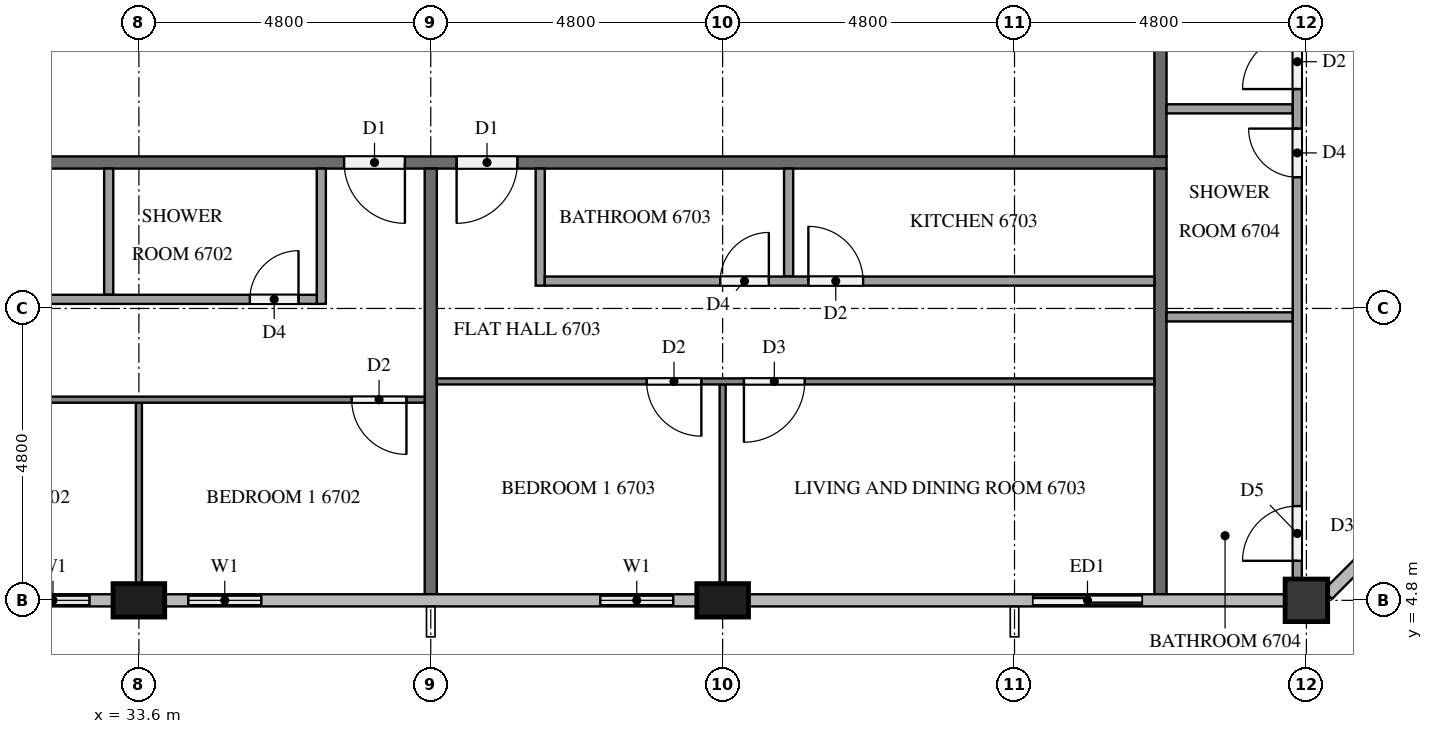
"""IFC4 building model, lengths in metres.
Left out: names, types, materials, properties, quantities, classifications, styles, units other than length and angle.
Written with IfcOpenShell. Run it as: python <this file> out.ifc"""

import sys

from ifc_helpers import new_model, si_unit, direction, frame, frame_2d, origin, origin_2d, place, context, subcontext, project, spatial, rectangle, extrude, element, fill, save


model = new_model("IFC4")
c1 = context("Model", 3, precision=1e-05, world=origin(), true_north=direction((0.0, 1.0)))
c2 = subcontext(c1, "Body", "Model", "MODEL_VIEW")
j1 = project(units=[si_unit("LENGTHUNIT", "METRE"), si_unit("PLANEANGLEUNIT", "RADIAN")], contexts=[c1])
p1 = place(None, origin())
s1 = spatial("IfcSite", under=j1, at=p1, CompositionType="ELEMENT")
p2 = place(p1, origin())
s2 = spatial("IfcBuilding", under=s1, at=p2, CompositionType="ELEMENT")
p3 = place(p2, frame((0.0, 0.0, 256.2)))
s3 = spatial("IfcBuildingStorey", under=s2, at=p3, CompositionType="ELEMENT", Elevation=256.2)
for number, where, z_axis, x_axis in (
    (1, (33.6, 4.8, 0.0), (0.0, 0.0, 1.0), (1.0, 0.0, 0.0)),
    (2, (43.2, 4.8, 0.0), (0.0, 0.0, 1.0), (1.0, 0.0, 0.0)),
):
    element("IfcColumn", number, at=place(p3, frame(where, z_axis=z_axis, x_axis=x_axis)), inside=s3, PredefinedType="COLUMN", context=c2, shape_type="SweptSolid", body=[
        extrude(rectangle(XDim=0.85, YDim=0.55, at=origin_2d()), origin(), (0.0, 0.0, 1.0), 3.2),
    ])
p4 = place(p3, frame((52.8, 4.8, 0.0), z_axis=(0.0, 0.0, 1.0), x_axis=(1.0, 0.0, 0.0)))
e3 = element("IfcColumn", 3, at=p4, inside=s3, PredefinedType="COLUMN", context=c2, shape_type="SweptSolid", body=[
    extrude(rectangle(XDim=0.7, YDim=0.7, at=origin_2d()), origin(), (0.0, 0.0, 1.0), 3.2),
])
p5 = place(p3, frame((31.2, 4.8, 0.0), z_axis=(0.0, 0.0, 1.0), x_axis=(1.0, 0.0, 0.0)))
e4 = element("IfcWall", 4, at=p5, inside=s3, PredefinedType="SOLIDWALL", context=c2, shape_type="SweptSolid", body=[
    extrude(rectangle(XDim=1.975, YDim=0.15, at=frame_2d((0.988, 0.0))), origin(), (0.0, 0.0, 1.0), 3.2),
])
p6 = place(p5, frame((0.387, 0.0, 0.9)))
e5 = element("IfcOpeningElement", 5, at=p6, cuts=e4, PredefinedType="OPENING", context=c2, shape_type="SweptSolid", body=[
    extrude(rectangle(XDim=1.2, YDim=1.4, at=frame_2d((0.6, 0.7))), frame((0.0, 0.085, 0.0), z_axis=(0.0, -1.0, 0.0), x_axis=(1.0, 0.0, 0.0)), (0.0, 0.0, 1.0), 0.17),
])
p7 = place(p3, frame((34.025, 4.8, 0.0), z_axis=(0.0, 0.0, 1.0), x_axis=(1.0, 0.0, 0.0)))
e6 = element("IfcWall", 6, at=p7, inside=s3, PredefinedType="SOLIDWALL", context=c2, shape_type="SweptSolid", body=[
    extrude(rectangle(XDim=1.975, YDim=0.15, at=frame_2d((0.988, 0.0))), origin(), (0.0, 0.0, 1.0), 3.2),
])
p8 = place(p7, frame((0.387, 0.0, 0.9)))
e7 = element("IfcOpeningElement", 7, at=p8, cuts=e6, PredefinedType="OPENING", context=c2, shape_type="SweptSolid", body=[
    extrude(rectangle(XDim=1.2, YDim=1.4, at=frame_2d((0.6, 0.7))), frame((0.0, 0.085, 0.0), z_axis=(0.0, -1.0, 0.0), x_axis=(1.0, 0.0, 0.0)), (0.0, 0.0, 1.0), 0.17),
])
p9 = place(p3, frame((40.8, 4.8, 0.0), z_axis=(0.0, 0.0, 1.0), x_axis=(1.0, 0.0, 0.0)))
e8 = element("IfcWall", 8, at=p9, inside=s3, PredefinedType="SOLIDWALL", context=c2, shape_type="SweptSolid", body=[
    extrude(rectangle(XDim=1.975, YDim=0.15, at=frame_2d((0.987, 0.0))), origin(), (0.0, 0.0, 1.0), 3.2),
])
p10 = place(p9, frame((0.387, 0.0, 0.9)))
e9 = element("IfcOpeningElement", 9, at=p10, cuts=e8, PredefinedType="OPENING", context=c2, shape_type="SweptSolid", body=[
    extrude(rectangle(XDim=1.2, YDim=1.4, at=frame_2d((0.6, 0.7))), frame((0.0, 0.085, 0.0), z_axis=(0.0, -1.0, 0.0), x_axis=(1.0, 0.0, 0.0)), (0.0, 0.0, 1.0), 0.17),
])
p11 = place(p3, frame((48.0, 4.8, 0.0), z_axis=(0.0, 0.0, 1.0), x_axis=(1.0, 0.0, 0.0)))
e10 = element("IfcWall", 10, at=p11, inside=s3, PredefinedType="SOLIDWALL", context=c2, shape_type="SweptSolid", body=[
    extrude(rectangle(XDim=2.4, YDim=0.15, at=frame_2d((1.2, 0.0))), origin(), (0.0, 0.0, 1.0), 3.2),
])
p12 = place(p11, frame((0.3, 0.0, 0.0)))
e11 = element("IfcOpeningElement", 11, at=p12, cuts=e10, PredefinedType="OPENING", context=c2, shape_type="SweptSolid", body=[
    extrude(rectangle(XDim=1.8, YDim=2.4, at=frame_2d((0.9, 1.2))), frame((0.0, 0.085, 0.0), z_axis=(0.0, -1.0, 0.0), x_axis=(1.0, 0.0, 0.0)), (0.0, 0.0, 1.0), 0.17),
])
p13 = place(p3, frame((50.5, 12.0, 0.0), z_axis=(0.0, 0.0, 1.0), x_axis=(-1.0, 0.0, 0.0)))
e12 = element("IfcWall", 12, at=p13, inside=s3, PredefinedType="PARTITIONING", context=c2, shape_type="SweptSolid", body=[
    extrude(rectangle(XDim=38.6, YDim=0.2, at=frame_2d((19.3, 0.0))), origin(), (0.0, 0.0, 1.0), 3.2),
])
p14 = place(p13, frame((37.075, 0.0, 0.0)))
e13 = element("IfcOpeningElement", 13, at=p14, cuts=e12, PredefinedType="OPENING", context=c2, shape_type="SweptSolid", body=[
    extrude(rectangle(XDim=1.0, YDim=2.1, at=frame_2d((0.5, 1.05))), frame((0.0, 0.11, 0.0), z_axis=(0.0, -1.0, 0.0), x_axis=(1.0, 0.0, 0.0)), (0.0, 0.0, 1.0), 0.22),
])
p15 = place(p13, frame((12.525, 0.0, 0.0)))
e14 = element("IfcOpeningElement", 14, at=p15, cuts=e12, PredefinedType="OPENING", context=c2, shape_type="SweptSolid", body=[
    extrude(rectangle(XDim=1.0, YDim=2.1, at=frame_2d((0.5, 1.05))), frame((0.0, 0.11, 0.0), z_axis=(0.0, -1.0, 0.0), x_axis=(1.0, 0.0, 0.0)), (0.0, 0.0, 1.0), 0.22),
])
p16 = place(p13, frame((10.675, 0.0, 0.0)))
e15 = element("IfcOpeningElement", 15, at=p16, cuts=e12, PredefinedType="OPENING", context=c2, shape_type="SweptSolid", body=[
    extrude(rectangle(XDim=1.0, YDim=2.1, at=frame_2d((0.5, 1.05))), frame((0.0, 0.11, 0.0), z_axis=(0.0, -1.0, 0.0), x_axis=(1.0, 0.0, 0.0)), (0.0, 0.0, 1.0), 0.22),
])
p17 = place(p3, frame((50.4, 40.7, 0.0), z_axis=(0.0, 0.0, 1.0), x_axis=(0.0, -1.0, 0.0)))
e16 = element("IfcWall", 16, at=p17, inside=s3, PredefinedType="PARTITIONING", context=c2, shape_type="SweptSolid", body=[
    extrude(rectangle(XDim=28.6, YDim=0.2, at=frame_2d((14.3, 0.0))), origin(), (0.0, 0.0, 1.0), 3.2),
])
p18 = place(p17, frame((19.525, 0.0, 0.0)))
e17 = element("IfcOpeningElement", 17, at=p18, cuts=e16, PredefinedType="OPENING", context=c2, shape_type="SweptSolid", body=[
    extrude(rectangle(XDim=1.0, YDim=2.1, at=frame_2d((0.5, 1.05))), frame((0.0, 0.11, 0.0), z_axis=(0.0, -1.0, 0.0), x_axis=(1.0, 0.0, 0.0)), (0.0, 0.0, 1.0), 0.22),
])
p19 = place(p17, frame((17.675, 0.0, 0.0)))
e18 = element("IfcOpeningElement", 18, at=p19, cuts=e16, PredefinedType="OPENING", context=c2, shape_type="SweptSolid", body=[
    extrude(rectangle(XDim=1.0, YDim=2.1, at=frame_2d((0.5, 1.05))), frame((0.0, 0.11, 0.0), z_axis=(0.0, -1.0, 0.0), x_axis=(1.0, 0.0, 0.0)), (0.0, 0.0, 1.0), 0.22),
])
p20 = place(p17, frame((0.325, 0.0, 0.0)))
e19 = element("IfcOpeningElement", 19, at=p20, cuts=e16, PredefinedType="OPENING", context=c2, shape_type="SweptSolid", body=[
    extrude(rectangle(XDim=1.0, YDim=2.1, at=frame_2d((0.5, 1.05))), frame((0.0, 0.11, 0.0), z_axis=(0.0, -1.0, 0.0), x_axis=(1.0, 0.0, 0.0)), (0.0, 0.0, 1.0), 0.22),
])
for number, where, z_axis, x_axis in (
    (20, (38.4, 11.9, 0.0), (0.0, 0.0, 1.0), (0.0, -1.0, 0.0)),
    (21, (50.4, 11.9, 0.0), (0.0, 0.0, 1.0), (0.0, -1.0, 0.0)),
):
    element("IfcWall", number, at=place(p3, frame(where, z_axis=z_axis, x_axis=x_axis)), inside=s3, PredefinedType="PARTITIONING", context=c2, shape_type="SweptSolid", body=[
        extrude(rectangle(XDim=7.0, YDim=0.2, at=frame_2d((3.5, 0.0))), origin(), (0.0, 0.0, 1.0), 3.2),
    ])
p21 = place(p3, frame((33.6, 8.05, 0.0), z_axis=(0.0, 0.0, 1.0), x_axis=(0.0, -1.0, 0.0)))
e22 = element("IfcWall", 22, at=p21, inside=s3, PredefinedType="PARTITIONING", context=c2, shape_type="SweptSolid", body=[
    extrude(rectangle(XDim=2.975, YDim=0.1, at=frame_2d((1.488, 0.0))), origin(), (0.0, 0.0, 1.0), 3.2),
])
p22 = place(p3, frame((38.3, 8.1, 0.0), z_axis=(0.0, 0.0, 1.0), x_axis=(-1.0, 0.0, 0.0)))
e23 = element("IfcWall", 23, at=p22, inside=s3, PredefinedType="PARTITIONING", context=c2, shape_type="SweptSolid", body=[
    extrude(rectangle(XDim=16.6, YDim=0.1, at=frame_2d((8.3, 0.0))), origin(), (0.0, 0.0, 1.0), 3.2),
])
p23 = place(p22, frame((0.3, 0.0, 0.0)))
e24 = element("IfcOpeningElement", 24, at=p23, cuts=e23, PredefinedType="OPENING", context=c2, shape_type="SweptSolid", body=[
    extrude(rectangle(XDim=0.9, YDim=2.1, at=frame_2d((0.45, 1.05))), frame((0.0, 0.06, 0.0), z_axis=(0.0, -1.0, 0.0), x_axis=(1.0, 0.0, 0.0)), (0.0, 0.0, 1.0), 0.12),
])
p24 = place(p22, frame((8.25, 0.0, 0.0)))
e25 = element("IfcOpeningElement", 25, at=p24, cuts=e23, PredefinedType="OPENING", context=c2, shape_type="SweptSolid", body=[
    extrude(rectangle(XDim=0.9, YDim=2.1, at=frame_2d((0.45, 1.05))), frame((0.0, 0.06, 0.0), z_axis=(0.0, -1.0, 0.0), x_axis=(1.0, 0.0, 0.0)), (0.0, 0.0, 1.0), 0.12),
])
p25 = place(p22, frame((9.85, 0.0, 0.0)))
e26 = element("IfcOpeningElement", 26, at=p25, cuts=e23, PredefinedType="OPENING", context=c2, shape_type="SweptSolid", body=[
    extrude(rectangle(XDim=1.0, YDim=2.1, at=frame_2d((0.5, 1.05))), frame((0.0, 0.06, 0.0), z_axis=(0.0, -1.0, 0.0), x_axis=(1.0, 0.0, 0.0)), (0.0, 0.0, 1.0), 0.12),
])
p26 = place(p3, frame((33.104, 11.9, 0.0), z_axis=(0.0, 0.0, 1.0), x_axis=(0.0, -1.0, 0.0)))
e27 = element("IfcWall", 27, at=p26, inside=s3, PredefinedType="PARTITIONING", context=c2, shape_type="SweptSolid", body=[
    extrude(rectangle(XDim=2.075, YDim=0.15, at=frame_2d((1.038, 0.0))), origin(), (0.0, 0.0, 1.0), 3.2),
])
p27 = place(p3, frame((36.6, 11.9, 0.0), z_axis=(0.0, 0.0, 1.0), x_axis=(0.0, -1.0, 0.0)))
e28 = element("IfcWall", 28, at=p27, inside=s3, PredefinedType="PARTITIONING", context=c2, shape_type="SweptSolid", body=[
    extrude(rectangle(XDim=2.225, YDim=0.15, at=frame_2d((1.112, 0.0))), origin(), (0.0, 0.0, 1.0), 3.2),
])
p28 = place(p3, frame((21.7, 9.75, 0.0), z_axis=(0.0, 0.0, 1.0), x_axis=(1.0, 0.0, 0.0)))
e29 = element("IfcWall", 29, at=p28, inside=s3, PredefinedType="PARTITIONING", context=c2, shape_type="SweptSolid", body=[
    extrude(rectangle(XDim=14.825, YDim=0.15, at=frame_2d((7.413, 0.0))), origin(), (0.0, 0.0, 1.0), 3.2),
])
p29 = place(p28, frame((13.725, 0.0, 0.0)))
e30 = element("IfcOpeningElement", 30, at=p29, cuts=e29, PredefinedType="OPENING", context=c2, shape_type="SweptSolid", body=[
    extrude(rectangle(XDim=0.8, YDim=2.1, at=frame_2d((0.4, 1.05))), frame((0.0, 0.085, 0.0), z_axis=(0.0, -1.0, 0.0), x_axis=(1.0, 0.0, 0.0)), (0.0, 0.0, 1.0), 0.17),
])
p30 = place(p28, frame((7.167, 0.0, 0.0)))
e31 = element("IfcOpeningElement", 31, at=p30, cuts=e29, PredefinedType="OPENING", context=c2, shape_type="SweptSolid", body=[
    extrude(rectangle(XDim=0.9, YDim=2.1, at=frame_2d((0.45, 1.05))), frame((0.0, 0.085, 0.0), z_axis=(0.0, -1.0, 0.0), x_axis=(1.0, 0.0, 0.0)), (0.0, 0.0, 1.0), 0.17),
])
p31 = place(p28, frame((5.617, 0.0, 0.0)))
e32 = element("IfcOpeningElement", 32, at=p31, cuts=e29, PredefinedType="OPENING", context=c2, shape_type="SweptSolid", body=[
    extrude(rectangle(XDim=0.9, YDim=2.1, at=frame_2d((0.45, 1.05))), frame((0.0, 0.085, 0.0), z_axis=(0.0, -1.0, 0.0), x_axis=(1.0, 0.0, 0.0)), (0.0, 0.0, 1.0), 0.17),
])
p32 = place(p3, frame((43.2, 8.35, 0.0), z_axis=(0.0, 0.0, 1.0), x_axis=(0.0, -1.0, 0.0)))
e33 = element("IfcWall", 33, at=p32, inside=s3, PredefinedType="PARTITIONING", context=c2, shape_type="SweptSolid", body=[
    extrude(rectangle(XDim=3.275, YDim=0.1, at=frame_2d((1.638, 0.0))), origin(), (0.0, 0.0, 1.0), 3.2),
])
p33 = place(p3, frame((50.3, 8.4, 0.0), z_axis=(0.0, 0.0, 1.0), x_axis=(-1.0, 0.0, 0.0)))
e34 = element("IfcWall", 34, at=p33, inside=s3, PredefinedType="PARTITIONING", context=c2, shape_type="SweptSolid", body=[
    extrude(rectangle(XDim=11.8, YDim=0.1, at=frame_2d((5.9, 0.0))), origin(), (0.0, 0.0, 1.0), 3.2),
])
p34 = place(p33, frame((7.45, 0.0, 0.0)))
e35 = element("IfcOpeningElement", 35, at=p34, cuts=e34, PredefinedType="OPENING", context=c2, shape_type="SweptSolid", body=[
    extrude(rectangle(XDim=0.9, YDim=2.1, at=frame_2d((0.45, 1.05))), frame((0.0, 0.06, 0.0), z_axis=(0.0, -1.0, 0.0), x_axis=(1.0, 0.0, 0.0)), (0.0, 0.0, 1.0), 0.12),
])
p35 = place(p33, frame((5.75, 0.0, 0.0)))
e36 = element("IfcOpeningElement", 36, at=p35, cuts=e34, PredefinedType="OPENING", context=c2, shape_type="SweptSolid", body=[
    extrude(rectangle(XDim=1.0, YDim=2.1, at=frame_2d((0.5, 1.05))), frame((0.0, 0.06, 0.0), z_axis=(0.0, -1.0, 0.0), x_axis=(1.0, 0.0, 0.0)), (0.0, 0.0, 1.0), 0.12),
])
p36 = place(p3, frame((44.285, 11.9, 0.0), z_axis=(0.0, 0.0, 1.0), x_axis=(0.0, -1.0, 0.0)))
e37 = element("IfcWall", 37, at=p36, inside=s3, PredefinedType="PARTITIONING", context=c2, shape_type="SweptSolid", body=[
    extrude(rectangle(XDim=1.775, YDim=0.15, at=frame_2d((0.887, 0.0))), origin(), (0.0, 0.0, 1.0), 3.2),
])
p37 = place(p3, frame((40.2, 11.9, 0.0), z_axis=(0.0, 0.0, 1.0), x_axis=(0.0, -1.0, 0.0)))
e38 = element("IfcWall", 38, at=p37, inside=s3, PredefinedType="PARTITIONING", context=c2, shape_type="SweptSolid", body=[
    extrude(rectangle(XDim=1.925, YDim=0.15, at=frame_2d((0.962, 0.0))), origin(), (0.0, 0.0, 1.0), 3.2),
])
p38 = place(p3, frame((40.275, 10.05, 0.0), z_axis=(0.0, 0.0, 1.0), x_axis=(1.0, 0.0, 0.0)))
e39 = element("IfcWall", 39, at=p38, inside=s3, PredefinedType="PARTITIONING", context=c2, shape_type="SweptSolid", body=[
    extrude(rectangle(XDim=10.025, YDim=0.15, at=frame_2d((5.013, 0.0))), origin(), (0.0, 0.0, 1.0), 3.2),
])
p39 = place(p38, frame((2.885, 0.0, 0.0)))
e40 = element("IfcOpeningElement", 40, at=p39, cuts=e39, PredefinedType="OPENING", context=c2, shape_type="SweptSolid", body=[
    extrude(rectangle(XDim=0.8, YDim=2.1, at=frame_2d((0.4, 1.05))), frame((0.0, 0.085, 0.0), z_axis=(0.0, -1.0, 0.0), x_axis=(1.0, 0.0, 0.0)), (0.0, 0.0, 1.0), 0.17),
])
p40 = place(p38, frame((4.335, 0.0, 0.0)))
e41 = element("IfcOpeningElement", 41, at=p40, cuts=e39, PredefinedType="OPENING", context=c2, shape_type="SweptSolid", body=[
    extrude(rectangle(XDim=0.9, YDim=2.1, at=frame_2d((0.45, 1.05))), frame((0.0, 0.085, 0.0), z_axis=(0.0, -1.0, 0.0), x_axis=(1.0, 0.0, 0.0)), (0.0, 0.0, 1.0), 0.17),
])
for number, where, z_axis, x_axis in (
    (42, (50.5, 12.883, 0.0), (0.0, 0.0, 1.0), (1.0, 0.0, 0.0)),
    (43, (50.5, 9.461, 0.0), (0.0, 0.0, 1.0), (1.0, 0.0, 0.0)),
):
    element("IfcWall", number, at=place(p3, frame(where, z_axis=z_axis, x_axis=x_axis)), inside=s3, PredefinedType="PARTITIONING", context=c2, shape_type="SweptSolid", body=[
        extrude(rectangle(XDim=2.075, YDim=0.15, at=frame_2d((1.038, 0.0))), origin(), (0.0, 0.0, 1.0), 3.2),
    ])
p41 = place(p3, frame((52.65, 5.15, 0.0), z_axis=(0.0, 0.0, 1.0), x_axis=(0.0, 1.0, 0.0)))
e44 = element("IfcWall", 44, at=p41, inside=s3, PredefinedType="PARTITIONING", context=c2, shape_type="SweptSolid", body=[
    extrude(rectangle(XDim=14.575, YDim=0.15, at=frame_2d((7.288, 0.0))), origin(), (0.0, 0.0, 1.0), 3.2),
])
p42 = place(p41, frame((8.058, 0.0, 0.0)))
e45 = element("IfcOpeningElement", 45, at=p42, cuts=e44, PredefinedType="OPENING", context=c2, shape_type="SweptSolid", body=[
    extrude(rectangle(XDim=0.9, YDim=2.1, at=frame_2d((0.45, 1.05))), frame((0.0, 0.085, 0.0), z_axis=(0.0, -1.0, 0.0), x_axis=(1.0, 0.0, 0.0)), (0.0, 0.0, 1.0), 0.17),
])
p43 = place(p41, frame((6.608, 0.0, 0.0)))
e46 = element("IfcOpeningElement", 46, at=p43, cuts=e44, PredefinedType="OPENING", context=c2, shape_type="SweptSolid", body=[
    extrude(rectangle(XDim=0.8, YDim=2.1, at=frame_2d((0.4, 1.05))), frame((0.0, 0.085, 0.0), z_axis=(0.0, -1.0, 0.0), x_axis=(1.0, 0.0, 0.0)), (0.0, 0.0, 1.0), 0.17),
])
p44 = place(p41, frame((0.3, 0.0, 0.0)))
e47 = element("IfcOpeningElement", 47, at=p44, cuts=e44, PredefinedType="OPENING", context=c2, shape_type="SweptSolid", body=[
    extrude(rectangle(XDim=0.9, YDim=2.1, at=frame_2d((0.45, 1.05))), frame((0.0, 0.085, 0.0), z_axis=(0.0, -1.0, 0.0), x_axis=(1.0, 0.0, 0.0)), (0.0, 0.0, 1.0), 0.17),
])
p45 = place(p6, origin())
e48 = element("IfcWindow", 48, at=p45, inside=s3, PartitioningType="SINGLE_PANEL", PredefinedType="WINDOW", context=c2, shape_type="SweptSolid", body=[
    extrude(rectangle(XDim=1.2, YDim=1.4, at=frame_2d((0.6, 0.7))), frame((0.0, 0.03, 0.0), z_axis=(0.0, -1.0, 0.0), x_axis=(1.0, 0.0, 0.0)), (0.0, 0.0, 1.0), 0.06),
])
fill(e5, e48)
p46 = place(p8, origin())
e49 = element("IfcWindow", 49, at=p46, inside=s3, PartitioningType="SINGLE_PANEL", PredefinedType="WINDOW", context=c2, shape_type="SweptSolid", body=[
    extrude(rectangle(XDim=1.2, YDim=1.4, at=frame_2d((0.6, 0.7))), frame((0.0, 0.03, 0.0), z_axis=(0.0, -1.0, 0.0), x_axis=(1.0, 0.0, 0.0)), (0.0, 0.0, 1.0), 0.06),
])
fill(e7, e49)
p47 = place(p10, origin())
e50 = element("IfcWindow", 50, at=p47, inside=s3, PartitioningType="SINGLE_PANEL", PredefinedType="WINDOW", context=c2, shape_type="SweptSolid", body=[
    extrude(rectangle(XDim=1.2, YDim=1.4, at=frame_2d((0.6, 0.7))), frame((0.0, 0.03, 0.0), z_axis=(0.0, -1.0, 0.0), x_axis=(1.0, 0.0, 0.0)), (0.0, 0.0, 1.0), 0.06),
])
fill(e9, e50)
p48 = place(p12, origin())
e51 = element("IfcDoor", 51, at=p48, inside=s3, OperationType="SLIDING_TO_RIGHT", PredefinedType="DOOR", context=c2, shape_type="SweptSolid", body=[
    extrude(rectangle(XDim=1.8, YDim=2.4, at=frame_2d((0.9, 1.2))), frame((0.0, 0.025, 0.0), z_axis=(0.0, -1.0, 0.0), x_axis=(1.0, 0.0, 0.0)), (0.0, 0.0, 1.0), 0.05),
])
fill(e11, e51)
p49 = place(p15, origin())
e52 = element("IfcDoor", 52, at=p49, inside=s3, OperationType="SINGLE_SWING_LEFT", PredefinedType="DOOR", context=c2, shape_type="SweptSolid", body=[
    extrude(rectangle(XDim=1.0, YDim=2.1, at=frame_2d((0.5, 1.05))), frame((0.0, 0.025, 0.0), z_axis=(0.0, -1.0, 0.0), x_axis=(1.0, 0.0, 0.0)), (0.0, 0.0, 1.0), 0.05),
])
fill(e14, e52)
p50 = place(p16, origin())
e53 = element("IfcDoor", 53, at=p50, inside=s3, OperationType="SINGLE_SWING_RIGHT", PredefinedType="DOOR", context=c2, shape_type="SweptSolid", body=[
    extrude(rectangle(XDim=1.0, YDim=2.1, at=frame_2d((0.5, 1.05))), frame((0.0, 0.025, 0.0), z_axis=(0.0, -1.0, 0.0), x_axis=(1.0, 0.0, 0.0)), (0.0, 0.0, 1.0), 0.05),
])
fill(e15, e53)
p51 = place(p23, origin())
e54 = element("IfcDoor", 54, at=p51, inside=s3, OperationType="SINGLE_SWING_LEFT", PredefinedType="DOOR", context=c2, shape_type="SweptSolid", body=[
    extrude(rectangle(XDim=0.9, YDim=2.1, at=frame_2d((0.45, 1.05))), frame((0.0, 0.025, 0.0), z_axis=(0.0, -1.0, 0.0), x_axis=(1.0, 0.0, 0.0)), (0.0, 0.0, 1.0), 0.05),
])
fill(e24, e54)
p52 = place(p29, origin())
e55 = element("IfcDoor", 55, at=p52, inside=s3, OperationType="SINGLE_SWING_RIGHT", PredefinedType="DOOR", context=c2, shape_type="SweptSolid", body=[
    extrude(rectangle(XDim=0.8, YDim=2.1, at=frame_2d((0.4, 1.05))), frame((0.0, 0.025, 0.0), z_axis=(0.0, -1.0, 0.0), x_axis=(1.0, 0.0, 0.0)), (0.0, 0.0, 1.0), 0.05),
])
fill(e30, e55)
p53 = place(p34, origin())
e56 = element("IfcDoor", 56, at=p53, inside=s3, OperationType="SINGLE_SWING_LEFT", PredefinedType="DOOR", context=c2, shape_type="SweptSolid", body=[
    extrude(rectangle(XDim=0.9, YDim=2.1, at=frame_2d((0.45, 1.05))), frame((0.0, 0.025, 0.0), z_axis=(0.0, -1.0, 0.0), x_axis=(1.0, 0.0, 0.0)), (0.0, 0.0, 1.0), 0.05),
])
fill(e35, e56)
p54 = place(p35, origin())
e57 = element("IfcDoor", 57, at=p54, inside=s3, OperationType="SINGLE_SWING_RIGHT", PredefinedType="DOOR", context=c2, shape_type="SweptSolid", body=[
    extrude(rectangle(XDim=1.0, YDim=2.1, at=frame_2d((0.5, 1.05))), frame((0.0, 0.025, 0.0), z_axis=(0.0, -1.0, 0.0), x_axis=(1.0, 0.0, 0.0)), (0.0, 0.0, 1.0), 0.05),
])
fill(e36, e57)
p55 = place(p39, origin())
e58 = element("IfcDoor", 58, at=p55, inside=s3, OperationType="SINGLE_SWING_RIGHT", PredefinedType="DOOR", context=c2, shape_type="SweptSolid", body=[
    extrude(rectangle(XDim=0.8, YDim=2.1, at=frame_2d((0.4, 1.05))), frame((0.0, 0.025, 0.0), z_axis=(0.0, -1.0, 0.0), x_axis=(1.0, 0.0, 0.0)), (0.0, 0.0, 1.0), 0.05),
])
fill(e40, e58)
p56 = place(p40, origin())
e59 = element("IfcDoor", 59, at=p56, inside=s3, OperationType="SINGLE_SWING_LEFT", PredefinedType="DOOR", context=c2, shape_type="SweptSolid", body=[
    extrude(rectangle(XDim=0.9, YDim=2.1, at=frame_2d((0.45, 1.05))), frame((0.0, 0.025, 0.0), z_axis=(0.0, -1.0, 0.0), x_axis=(1.0, 0.0, 0.0)), (0.0, 0.0, 1.0), 0.05),
])
fill(e41, e59)
p57 = place(p42, origin())
e60 = element("IfcDoor", 60, at=p57, inside=s3, OperationType="SINGLE_SWING_LEFT", PredefinedType="DOOR", context=c2, shape_type="SweptSolid", body=[
    extrude(rectangle(XDim=0.9, YDim=2.1, at=frame_2d((0.45, 1.05))), frame((0.0, 0.025, 0.0), z_axis=(0.0, -1.0, 0.0), x_axis=(1.0, 0.0, 0.0)), (0.0, 0.0, 1.0), 0.05),
])
fill(e45, e60)
p58 = place(p43, origin())
e61 = element("IfcDoor", 61, at=p58, inside=s3, OperationType="SINGLE_SWING_RIGHT", PredefinedType="DOOR", context=c2, shape_type="SweptSolid", body=[
    extrude(rectangle(XDim=0.8, YDim=2.1, at=frame_2d((0.4, 1.05))), frame((0.0, 0.025, 0.0), z_axis=(0.0, -1.0, 0.0), x_axis=(1.0, 0.0, 0.0)), (0.0, 0.0, 1.0), 0.05),
])
fill(e46, e61)
p59 = place(p44, origin())
e62 = element("IfcDoor", 62, at=p59, inside=s3, OperationType="SINGLE_SWING_LEFT", PredefinedType="DOOR", context=c2, shape_type="SweptSolid", body=[
    extrude(rectangle(XDim=0.9, YDim=2.1, at=frame_2d((0.45, 1.05))), frame((0.0, 0.025, 0.0), z_axis=(0.0, -1.0, 0.0), x_axis=(1.0, 0.0, 0.0)), (0.0, 0.0, 1.0), 0.05),
])
fill(e47, e62)
save(model, sys.argv[1])
